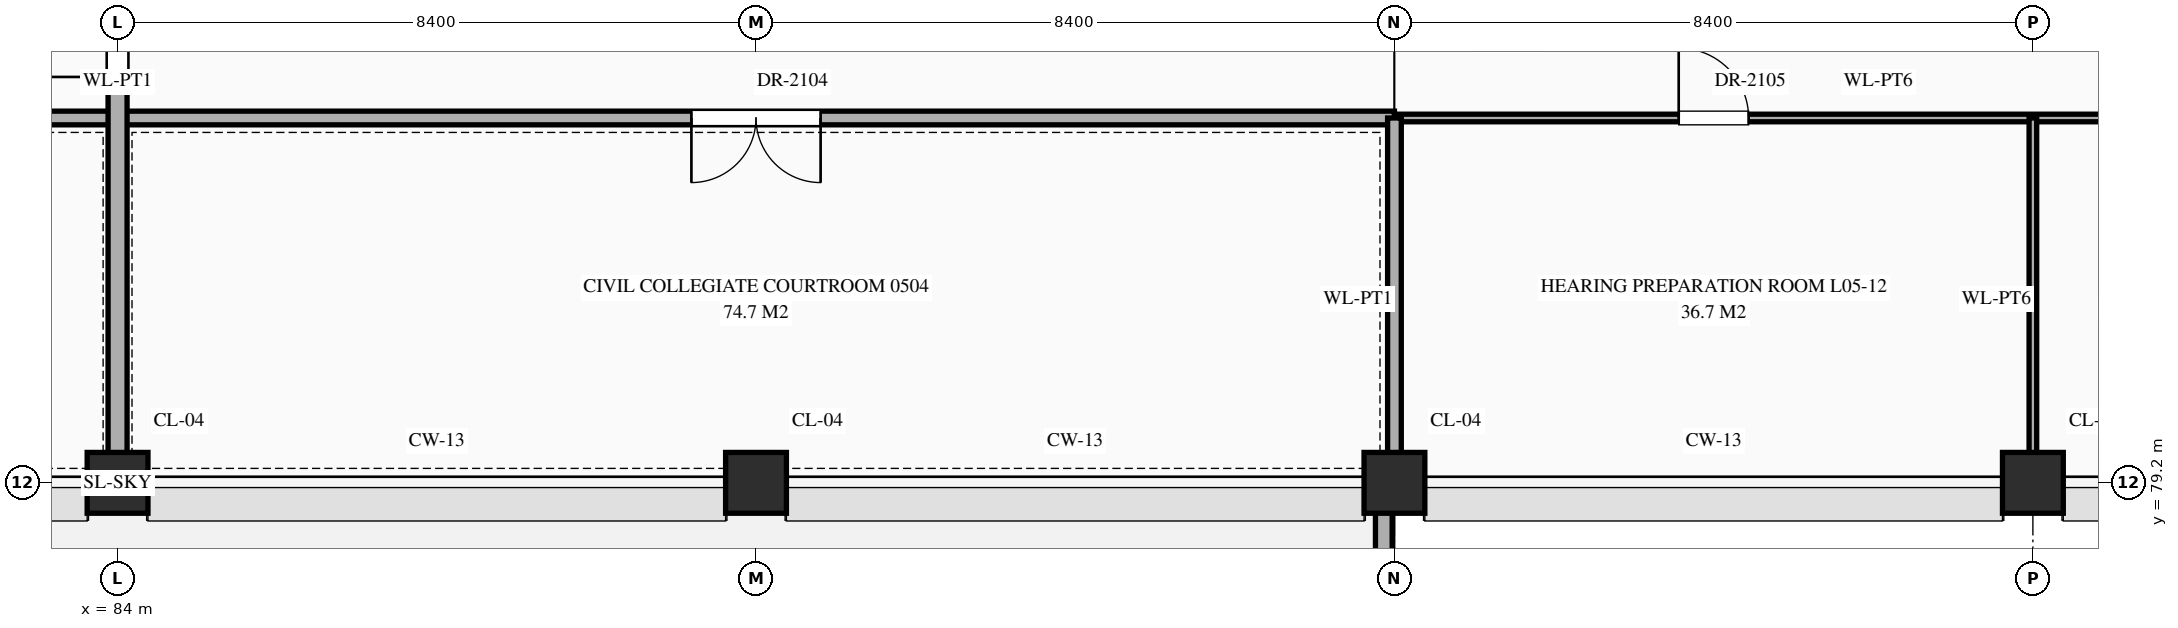
"""IFC4 building model, lengths in metres.
Left out: names, types, materials, properties, quantities, classifications, styles, units other than length and angle.
Written with IfcOpenShell. Run it as: python <this file> out.ifc"""

import sys

from ifc_helpers import new_model, si_unit, direction, frame, frame_2d, origin, origin_2d, place, context, subcontext, project, spatial, rectangle, extrude, element, fill, save


model = new_model("IFC4")
c1 = context("Model", 3, precision=1e-05, world=origin(), true_north=direction((0.0, 1.0)))
c2 = subcontext(c1, "Body", "Model", "MODEL_VIEW")
j1 = project(units=[si_unit("LENGTHUNIT", "METRE"), si_unit("PLANEANGLEUNIT", "RADIAN")], contexts=[c1])
p1 = place(None, origin())
s1 = spatial("IfcSite", under=j1, at=p1, CompositionType="ELEMENT")
p2 = place(p1, origin())
s2 = spatial("IfcBuilding", under=s1, at=p2, CompositionType="ELEMENT")
p3 = place(p2, frame((0.0, 0.0, 21.6)))
s3 = spatial("IfcBuildingStorey", under=s2, at=p3, CompositionType="ELEMENT", Elevation=21.6)
for number, where, z_axis, x_axis in (
    (1, (84.0, 79.2, 0.0), (0.0, 0.0, 1.0), (1.0, 0.0, 0.0)),
    (2, (92.4, 79.2, 0.0), (0.0, 0.0, 1.0), (1.0, 0.0, 0.0)),
    (3, (100.8, 79.2, 0.0), (0.0, 0.0, 1.0), (1.0, 0.0, 0.0)),
    (4, (109.2, 79.2, 0.0), (0.0, 0.0, 1.0), (1.0, 0.0, 0.0)),
):
    element("IfcColumn", number, at=place(p3, frame(where, z_axis=z_axis, x_axis=x_axis)), inside=s3, PredefinedType="COLUMN", context=c2, shape_type="SweptSolid", body=[
        extrude(rectangle(XDim=0.8, YDim=0.8, at=origin_2d()), origin(), (0.0, 0.0, 1.0), 4.5),
    ])
p4 = place(p3, frame((100.66, 64.94, 0.0), z_axis=(0.0, 0.0, 1.0), x_axis=(0.0, 1.0, 0.0)))
e5 = element("IfcWall", 5, at=p4, inside=s3, PredefinedType="PARAPET", context=c2, shape_type="SweptSolid", body=[
    extrude(rectangle(XDim=13.96, YDim=0.22, at=frame_2d((6.98, 0.0))), origin(), (0.0, 0.0, 1.0), 1.2),
])
p5 = place(p3, frame((67.2, 84.0, 0.0), z_axis=(0.0, 0.0, 1.0), x_axis=(1.0, 0.0, 0.0)))
e6 = element("IfcWall", 6, at=p5, inside=s3, PredefinedType="STANDARD", context=c2, shape_type="SweptSolid", body=[
    extrude(rectangle(XDim=33.6, YDim=0.18, at=frame_2d((16.8, 0.0))), origin(), (0.0, 0.0, 1.0), 4.24),
])
p6 = place(p5, frame((7.575, 0.0, 0.0)))
e7 = element("IfcOpeningElement", 7, at=p6, cuts=e6, PredefinedType="OPENING", context=c2, shape_type="SweptSolid", body=[
    extrude(rectangle(XDim=1.65, YDim=2.4, at=frame_2d((0.825, 1.2))), frame((0.0, 0.102, 0.0), z_axis=(0.0, -1.0, 0.0), x_axis=(1.0, 0.0, 0.0)), (0.0, 0.0, 1.0), 0.204),
])
p7 = place(p5, frame((24.35, 0.0, 0.0)))
e8 = element("IfcOpeningElement", 8, at=p7, cuts=e6, PredefinedType="OPENING", context=c2, shape_type="SweptSolid", body=[
    extrude(rectangle(XDim=1.7, YDim=2.45, at=frame_2d((0.85, 1.225))), frame((0.0, 0.102, 0.0), z_axis=(0.0, -1.0, 0.0), x_axis=(1.0, 0.0, 0.0)), (0.0, 0.0, 1.0), 0.204),
])
p8 = place(p3, frame((100.8, 84.0, 0.0), z_axis=(0.0, 0.0, 1.0), x_axis=(1.0, 0.0, 0.0)))
e9 = element("IfcWall", 9, at=p8, inside=s3, PredefinedType="STANDARD", context=c2, shape_type="SweptSolid", body=[
    extrude(rectangle(XDim=16.8, YDim=0.1, at=frame_2d((8.4, 0.0))), origin(), (0.0, 0.0, 1.0), 4.24),
])
p9 = place(p8, frame((3.74, 0.0, 0.0)))
e10 = element("IfcOpeningElement", 10, at=p9, cuts=e9, PredefinedType="OPENING", context=c2, shape_type="SweptSolid", body=[
    extrude(rectangle(XDim=0.92, YDim=2.15, at=frame_2d((0.46, 1.075))), frame((0.0, 0.062, 0.0), z_axis=(0.0, -1.0, 0.0), x_axis=(1.0, 0.0, 0.0)), (0.0, 0.0, 1.0), 0.124),
])
p10 = place(p8, frame((12.12, 0.0, 0.0)))
e11 = element("IfcOpeningElement", 11, at=p10, cuts=e9, PredefinedType="OPENING", context=c2, shape_type="SweptSolid", body=[
    extrude(rectangle(XDim=0.96, YDim=2.2, at=frame_2d((0.48, 1.1))), frame((0.0, 0.062, 0.0), z_axis=(0.0, -1.0, 0.0), x_axis=(1.0, 0.0, 0.0)), (0.0, 0.0, 1.0), 0.124),
])
p11 = place(p3, frame((84.0, 79.24, 0.0), z_axis=(0.0, 0.0, 1.0), x_axis=(0.0, 1.0, 0.0)))
e12 = element("IfcWall", 12, at=p11, inside=s3, PredefinedType="STANDARD", context=c2, shape_type="SweptSolid", body=[
    extrude(rectangle(XDim=35.92, YDim=0.25, at=frame_2d((17.96, 0.0))), origin(), (0.0, 0.0, 1.0), 3.49),
])
p12 = place(p11, frame((22.72, 0.0, 0.0)))
e13 = element("IfcOpeningElement", 13, at=p12, cuts=e12, PredefinedType="OPENING", context=c2, shape_type="SweptSolid", body=[
    extrude(rectangle(XDim=1.6, YDim=2.3, at=frame_2d((0.8, 1.15))), frame((0.0, 0.137, 0.0), z_axis=(0.0, -1.0, 0.0), x_axis=(1.0, 0.0, 0.0)), (0.0, 0.0, 1.0), 0.274),
])
p13 = place(p11, frame((12.45, 0.0, 0.0)))
e14 = element("IfcOpeningElement", 14, at=p13, cuts=e12, PredefinedType="OPENING", context=c2, shape_type="SweptSolid", body=[
    extrude(rectangle(XDim=1.1, YDim=2.2, at=frame_2d((0.55, 1.1))), frame((0.0, 0.137, 0.0), z_axis=(0.0, -1.0, 0.0), x_axis=(1.0, 0.0, 0.0)), (0.0, 0.0, 1.0), 0.274),
])
p14 = place(p11, frame((15.245, 0.0, 0.0)))
e15 = element("IfcOpeningElement", 15, at=p14, cuts=e12, PredefinedType="OPENING", context=c2, shape_type="SweptSolid", body=[
    extrude(rectangle(XDim=0.95, YDim=2.15, at=frame_2d((0.475, 1.075))), frame((0.0, 0.137, 0.0), z_axis=(0.0, -1.0, 0.0), x_axis=(1.0, 0.0, 0.0)), (0.0, 0.0, 1.0), 0.274),
])
p15 = place(p11, frame((25.9, 0.0, 0.0)))
e16 = element("IfcOpeningElement", 16, at=p15, cuts=e12, PredefinedType="OPENING", context=c2, shape_type="SweptSolid", body=[
    extrude(rectangle(XDim=1.8, YDim=2.35, at=frame_2d((0.9, 1.175))), frame((0.0, 0.137, 0.0), z_axis=(0.0, -1.0, 0.0), x_axis=(1.0, 0.0, 0.0)), (0.0, 0.0, 1.0), 0.274),
])
p16 = place(p11, frame((29.62, 0.0, 0.0)))
e17 = element("IfcOpeningElement", 17, at=p16, cuts=e12, PredefinedType="OPENING", context=c2, shape_type="SweptSolid", body=[
    extrude(rectangle(XDim=1.0, YDim=2.2, at=frame_2d((0.5, 1.1))), frame((0.0, 0.137, 0.0), z_axis=(0.0, -1.0, 0.0), x_axis=(1.0, 0.0, 0.0)), (0.0, 0.0, 1.0), 0.274),
])
p17 = place(p11, frame((5.3, 0.0, 0.0)))
e18 = element("IfcOpeningElement", 18, at=p17, cuts=e12, PredefinedType="OPENING", context=c2, shape_type="SweptSolid", body=[
    extrude(rectangle(XDim=1.0, YDim=2.2, at=frame_2d((0.5, 1.1))), frame((0.0, 0.137, 0.0), z_axis=(0.0, -1.0, 0.0), x_axis=(1.0, 0.0, 0.0)), (0.0, 0.0, 1.0), 0.274),
])
p18 = place(p3, frame((100.8, 79.24, 0.0), z_axis=(0.0, 0.0, 1.0), x_axis=(0.0, 1.0, 0.0)))
e19 = element("IfcWall", 19, at=p18, inside=s3, PredefinedType="STANDARD", context=c2, shape_type="SweptSolid", body=[
    extrude(rectangle(XDim=4.76, YDim=0.18, at=frame_2d((2.38, 0.0))), origin(), (0.0, 0.0, 1.0), 3.49),
])
p19 = place(p3, frame((109.2, 79.24, 0.0), z_axis=(0.0, 0.0, 1.0), x_axis=(0.0, 1.0, 0.0)))
e20 = element("IfcWall", 20, at=p19, inside=s3, PredefinedType="STANDARD", context=c2, shape_type="SweptSolid", body=[
    extrude(rectangle(XDim=4.76, YDim=0.1, at=frame_2d((2.38, 0.0))), origin(), (0.0, 0.0, 1.0), 3.49),
])
p20 = place(p17, origin())
e21 = element("IfcDoor", 21, at=p20, inside=s3, OperationType="SINGLE_SWING_LEFT", PredefinedType="DOOR", context=c2, shape_type="SweptSolid", body=[
    extrude(rectangle(XDim=1.0, YDim=2.2, at=frame_2d((0.5, 1.1))), frame((0.0, 0.025, 0.0), z_axis=(0.0, -1.0, 0.0), x_axis=(1.0, 0.0, 0.0)), (0.0, 0.0, 1.0), 0.05),
])
fill(e18, e21)
p21 = place(p7, frame((1.7, 0.0, 0.0), z_axis=(0.0, 0.0, 1.0), x_axis=(-1.0, 0.0, 0.0)))
e22 = element("IfcDoor", 22, at=p21, inside=s3, OperationType="DOUBLE_DOOR_SINGLE_SWING", PredefinedType="DOOR", context=c2, shape_type="SweptSolid", body=[
    extrude(rectangle(XDim=1.7, YDim=2.45, at=frame_2d((0.85, 1.225))), frame((0.0, 0.025, 0.0), z_axis=(0.0, -1.0, 0.0), x_axis=(1.0, 0.0, 0.0)), (0.0, 0.0, 1.0), 0.05),
])
fill(e8, e22)
p22 = place(p9, origin())
e23 = element("IfcDoor", 23, at=p22, inside=s3, OperationType="SINGLE_SWING_LEFT", PredefinedType="DOOR", context=c2, shape_type="SweptSolid", body=[
    extrude(rectangle(XDim=0.92, YDim=2.15, at=frame_2d((0.46, 1.075))), frame((0.0, 0.025, 0.0), z_axis=(0.0, -1.0, 0.0), x_axis=(1.0, 0.0, 0.0)), (0.0, 0.0, 1.0), 0.05),
])
fill(e10, e23)
save(model, sys.argv[1])
